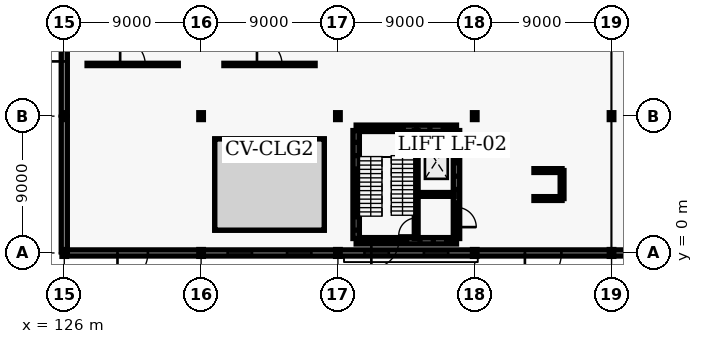
"""IFC4 building model, lengths in metres.
Left out: names, types, materials, properties, quantities, classifications, styles, units other than length and angle.
Written with IfcOpenShell. Run it as: python <this file> out.ifc"""

import sys

from ifc_helpers import new_model, si_unit, direction, frame, frame_2d, origin, origin_2d, place, context, subcontext, project, spatial, rectangle, i_section, extrude, element, fill, save


model = new_model("IFC4")
c1 = context("Model", 3, precision=1e-05, world=origin(), true_north=direction((0.0, 1.0)))
c2 = subcontext(c1, "Body", "Model", "MODEL_VIEW")
j1 = project(units=[si_unit("LENGTHUNIT", "METRE"), si_unit("PLANEANGLEUNIT", "RADIAN")], contexts=[c1])
p1 = place(None, origin())
s1 = spatial("IfcSite", under=j1, at=p1, CompositionType="ELEMENT")
p2 = place(p1, origin())
s2 = spatial("IfcBuilding", under=s1, at=p2, CompositionType="ELEMENT")
p3 = place(p2, origin())
s3 = spatial("IfcBuildingStorey", under=s2, at=p3, CompositionType="ELEMENT", Elevation=0.0)
for number, where, z_axis, x_axis in (
    (1, (126.0, 0.0, 0.0), (0.0, 0.0, 1.0), (1.0, 0.0, 0.0)),
    (2, (126.0, 9.0, 0.0), (0.0, 0.0, 1.0), (1.0, 0.0, 0.0)),
    (3, (135.0, 0.0, 0.0), (0.0, 0.0, 1.0), (1.0, 0.0, 0.0)),
    (4, (135.0, 9.0, 0.0), (0.0, 0.0, 1.0), (1.0, 0.0, 0.0)),
    (5, (144.0, 0.0, 0.0), (0.0, 0.0, 1.0), (1.0, 0.0, 0.0)),
    (6, (144.0, 9.0, 0.0), (0.0, 0.0, 1.0), (1.0, 0.0, 0.0)),
    (7, (153.0, 0.0, 0.0), (0.0, 0.0, 1.0), (1.0, 0.0, 0.0)),
    (8, (153.0, 9.0, 0.0), (0.0, 0.0, 1.0), (1.0, 0.0, 0.0)),
    (9, (162.0, 0.0, 0.0), (0.0, 0.0, 1.0), (1.0, 0.0, 0.0)),
    (10, (162.0, 9.0, 0.0), (0.0, 0.0, 1.0), (1.0, 0.0, 0.0)),
):
    element("IfcColumn", number, at=place(p3, frame(where, z_axis=z_axis, x_axis=x_axis)), inside=s3, PredefinedType="COLUMN", context=c2, shape_type="SweptSolid", body=[
        extrude(i_section(OverallWidth=0.3, OverallDepth=0.45, WebThickness=0.014, FlangeThickness=0.026, FilletRadius=0.027, at=origin_2d()), origin(), (0.0, 0.0, 1.0), 5.4),
    ])
p4 = place(p3, frame((126.06, 0.0, 0.0), z_axis=(0.0, 0.0, 1.0), x_axis=(1.0, 0.0, 0.0)))
e11 = element("IfcWall", 11, at=p4, inside=s3, PredefinedType="SOLIDWALL", context=c2, shape_type="SweptSolid", body=[
    extrude(rectangle(XDim=8.88, YDim=0.4, at=frame_2d((4.44, 0.0))), origin(), (0.0, 0.0, 1.0), 4.7),
])
p5 = place(p4, frame((3.44, 0.0, 0.0)))
e12 = element("IfcOpeningElement", 12, at=p5, cuts=e11, PredefinedType="OPENING", context=c2, shape_type="SweptSolid", body=[
    extrude(rectangle(XDim=2.0, YDim=2.3, at=frame_2d((1.0, 1.15))), frame((0.0, 0.21, 0.0), z_axis=(0.0, -1.0, 0.0), x_axis=(1.0, 0.0, 0.0)), (0.0, 0.0, 1.0), 0.42),
])
p6 = place(p3, frame((135.06, 0.0, 0.0), z_axis=(0.0, 0.0, 1.0), x_axis=(1.0, 0.0, 0.0)))
e13 = element("IfcWall", 13, at=p6, inside=s3, PredefinedType="SOLIDWALL", context=c2, shape_type="SweptSolid", body=[
    extrude(rectangle(XDim=8.88, YDim=0.4, at=frame_2d((4.44, 0.0))), origin(), (0.0, 0.0, 1.0), 4.7),
])
p7 = place(p6, frame((1.686, 0.0, 0.9)))
e14 = element("IfcOpeningElement", 14, at=p7, cuts=e13, PredefinedType="OPENING", context=c2, shape_type="SweptSolid", body=[
    extrude(rectangle(XDim=1.6, YDim=2.4, at=frame_2d((0.8, 1.2))), frame((0.0, 0.21, 0.0), z_axis=(0.0, -1.0, 0.0), x_axis=(1.0, 0.0, 0.0)), (0.0, 0.0, 1.0), 0.42),
])
p8 = place(p6, frame((5.594, 0.0, 0.9)))
e15 = element("IfcOpeningElement", 15, at=p8, cuts=e13, PredefinedType="OPENING", context=c2, shape_type="SweptSolid", body=[
    extrude(rectangle(XDim=1.6, YDim=2.4, at=frame_2d((0.8, 1.2))), frame((0.0, 0.21, 0.0), z_axis=(0.0, -1.0, 0.0), x_axis=(1.0, 0.0, 0.0)), (0.0, 0.0, 1.0), 0.42),
])
p9 = place(p3, frame((144.06, 0.0, 0.0), z_axis=(0.0, 0.0, 1.0), x_axis=(1.0, 0.0, 0.0)))
e16 = element("IfcWall", 16, at=p9, inside=s3, PredefinedType="SOLIDWALL", context=c2, shape_type="SweptSolid", body=[
    extrude(rectangle(XDim=8.88, YDim=0.4, at=frame_2d((4.44, 0.0))), origin(), (0.0, 0.0, 1.0), 4.7),
])
p10 = place(p9, frame((1.686, 0.0, 0.9)))
e17 = element("IfcOpeningElement", 17, at=p10, cuts=e16, PredefinedType="OPENING", context=c2, shape_type="SweptSolid", body=[
    extrude(rectangle(XDim=1.6, YDim=2.4, at=frame_2d((0.8, 1.2))), frame((0.0, 0.21, 0.0), z_axis=(0.0, -1.0, 0.0), x_axis=(1.0, 0.0, 0.0)), (0.0, 0.0, 1.0), 0.42),
])
p11 = place(p9, frame((5.594, 0.0, 0.9)))
e18 = element("IfcOpeningElement", 18, at=p11, cuts=e16, PredefinedType="OPENING", context=c2, shape_type="SweptSolid", body=[
    extrude(rectangle(XDim=1.6, YDim=2.4, at=frame_2d((0.8, 1.2))), frame((0.0, 0.21, 0.0), z_axis=(0.0, -1.0, 0.0), x_axis=(1.0, 0.0, 0.0)), (0.0, 0.0, 1.0), 0.42),
])
p12 = place(p3, frame((153.06, 0.0, 0.0), z_axis=(0.0, 0.0, 1.0), x_axis=(1.0, 0.0, 0.0)))
e19 = element("IfcWall", 19, at=p12, inside=s3, PredefinedType="SOLIDWALL", context=c2, shape_type="SweptSolid", body=[
    extrude(rectangle(XDim=8.88, YDim=0.4, at=frame_2d((4.44, 0.0))), origin(), (0.0, 0.0, 1.0), 4.7),
])
p13 = place(p12, frame((3.24, 0.0, 0.0)))
e20 = element("IfcOpeningElement", 20, at=p13, cuts=e19, PredefinedType="OPENING", context=c2, shape_type="SweptSolid", body=[
    extrude(rectangle(XDim=2.4, YDim=2.5, at=frame_2d((1.2, 1.25))), frame((0.0, 0.21, 0.0), z_axis=(0.0, -1.0, 0.0), x_axis=(1.0, 0.0, 0.0)), (0.0, 0.0, 1.0), 0.42),
])
p14 = place(p3, frame((162.06, 0.0, 0.0), z_axis=(0.0, 0.0, 1.0), x_axis=(1.0, 0.0, 0.0)))
e21 = element("IfcWall", 21, at=p14, inside=s3, PredefinedType="SOLIDWALL", context=c2, shape_type="SweptSolid", body=[
    extrude(rectangle(XDim=8.88, YDim=0.4, at=frame_2d((4.44, 0.0))), origin(), (0.0, 0.0, 1.0), 4.7),
])
p15 = place(p14, frame((1.686, 0.0, 0.9)))
e22 = element("IfcOpeningElement", 22, at=p15, cuts=e21, PredefinedType="OPENING", context=c2, shape_type="SweptSolid", body=[
    extrude(rectangle(XDim=1.6, YDim=2.4, at=frame_2d((0.8, 1.2))), frame((0.0, 0.21, 0.0), z_axis=(0.0, -1.0, 0.0), x_axis=(1.0, 0.0, 0.0)), (0.0, 0.0, 1.0), 0.42),
])
p16 = place(p14, frame((5.594, 0.0, 0.9)))
e23 = element("IfcOpeningElement", 23, at=p16, cuts=e21, PredefinedType="OPENING", context=c2, shape_type="SweptSolid", body=[
    extrude(rectangle(XDim=1.6, YDim=2.4, at=frame_2d((0.8, 1.2))), frame((0.0, 0.21, 0.0), z_axis=(0.0, -1.0, 0.0), x_axis=(1.0, 0.0, 0.0)), (0.0, 0.0, 1.0), 0.42),
])
p17 = place(p3, frame((126.0, 0.06, 0.0), z_axis=(0.0, 0.0, 1.0), x_axis=(0.0, 1.0, 0.0)))
e24 = element("IfcWall", 24, at=p17, inside=s3, PredefinedType="SOLIDWALL", context=c2, shape_type="SweptSolid", body=[
    extrude(rectangle(XDim=8.88, YDim=0.4, at=frame_2d((4.44, 0.0))), origin(), (0.0, 0.0, 1.0), 4.7),
])
p18 = place(p3, frame((126.0, 9.06, 0.0), z_axis=(0.0, 0.0, 1.0), x_axis=(0.0, 1.0, 0.0)))
e25 = element("IfcWall", 25, at=p18, inside=s3, PredefinedType="SOLIDWALL", context=c2, shape_type="SweptSolid", body=[
    extrude(rectangle(XDim=8.88, YDim=0.4, at=frame_2d((4.44, 0.0))), origin(), (0.0, 0.0, 1.0), 4.7),
])
p19 = place(p18, frame((3.54, 0.0, 0.0)))
e26 = element("IfcOpeningElement", 26, at=p19, cuts=e25, PredefinedType="OPENING", context=c2, shape_type="SweptSolid", body=[
    extrude(rectangle(XDim=1.8, YDim=2.2, at=frame_2d((0.9, 1.1))), frame((0.0, 0.21, 0.0), z_axis=(0.0, -1.0, 0.0), x_axis=(1.0, 0.0, 0.0)), (0.0, 0.0, 1.0), 0.42),
])
p20 = place(p3, frame((145.2, 0.8, 0.0), z_axis=(0.0, 0.0, 1.0), x_axis=(1.0, 0.0, 0.0)))
e27 = element("IfcWall", 27, at=p20, inside=s3, PredefinedType="SHEAR", context=c2, shape_type="SweptSolid", body=[
    extrude(rectangle(XDim=6.6, YDim=0.42, at=frame_2d((3.3, 0.0))), origin(), (0.0, 0.0, 1.0), 5.4),
])
p21 = place(p20, frame((1.0, 0.0, 0.0)))
e28 = element("IfcOpeningElement", 28, at=p21, cuts=e27, PredefinedType="OPENING", context=c2, shape_type="SweptSolid", body=[
    extrude(rectangle(XDim=1.8, YDim=2.15, at=frame_2d((0.9, 1.075))), frame((0.0, 0.22, 0.0), z_axis=(0.0, -1.0, 0.0), x_axis=(1.0, 0.0, 0.0)), (0.0, 0.0, 1.0), 0.44),
])
p22 = place(p3, frame((145.2, 8.2, 0.0), z_axis=(0.0, 0.0, 1.0), x_axis=(1.0, 0.0, 0.0)))
e29 = element("IfcWall", 29, at=p22, inside=s3, PredefinedType="SHEAR", context=c2, shape_type="SweptSolid", body=[
    extrude(rectangle(XDim=6.6, YDim=0.42, at=frame_2d((3.3, 0.0))), origin(), (0.0, 0.0, 1.0), 5.4),
])
p23 = place(p3, frame((145.2, 0.95, 0.0), z_axis=(0.0, 0.0, 1.0), x_axis=(0.0, 1.0, 0.0)))
e30 = element("IfcWall", 30, at=p23, inside=s3, PredefinedType="SHEAR", context=c2, shape_type="SweptSolid", body=[
    extrude(rectangle(XDim=7.1, YDim=0.42, at=frame_2d((3.55, 0.0))), origin(), (0.0, 0.0, 1.0), 5.4),
])
p24 = place(p3, frame((151.8, 0.95, 0.0), z_axis=(0.0, 0.0, 1.0), x_axis=(0.0, 1.0, 0.0)))
e31 = element("IfcWall", 31, at=p24, inside=s3, PredefinedType="SHEAR", context=c2, shape_type="SweptSolid", body=[
    extrude(rectangle(XDim=7.1, YDim=0.42, at=frame_2d((3.55, 0.0))), origin(), (0.0, 0.0, 1.0), 5.4),
])
p25 = place(p24, frame((0.75, 0.0, 0.0)))
e32 = element("IfcOpeningElement", 32, at=p25, cuts=e31, PredefinedType="OPENING", context=c2, shape_type="SweptSolid", body=[
    extrude(rectangle(XDim=1.3, YDim=2.15, at=frame_2d((0.65, 1.075))), frame((0.0, 0.22, 0.0), z_axis=(0.0, -1.0, 0.0), x_axis=(1.0, 0.0, 0.0)), (0.0, 0.0, 1.0), 0.44),
])
p26 = place(p3, frame((149.15, 0.95, 0.0), z_axis=(0.0, 0.0, 1.0), x_axis=(0.0, 1.0, 0.0)))
e33 = element("IfcWall", 33, at=p26, inside=s3, PredefinedType="SHEAR", context=c2, shape_type="SweptSolid", body=[
    extrude(rectangle(XDim=7.1, YDim=0.25, at=frame_2d((3.55, 0.0))), origin(), (0.0, 0.0, 1.0), 5.4),
])
p27 = place(p26, frame((0.2, 0.0, 0.0)))
e34 = element("IfcOpeningElement", 34, at=p27, cuts=e33, PredefinedType="OPENING", context=c2, shape_type="SweptSolid", body=[
    extrude(rectangle(XDim=1.15, YDim=2.15, at=frame_2d((0.575, 1.075))), frame((0.0, 0.135, 0.0), z_axis=(0.0, -1.0, 0.0), x_axis=(1.0, 0.0, 0.0)), (0.0, 0.0, 1.0), 0.27),
])
p28 = place(p3, frame((149.27, 3.85, 0.0), z_axis=(0.0, 0.0, 1.0), x_axis=(1.0, 0.0, 0.0)))
e35 = element("IfcWall", 35, at=p28, inside=s3, PredefinedType="SHEAR", context=c2, shape_type="SweptSolid", body=[
    extrude(rectangle(XDim=2.38, YDim=0.25, at=frame_2d((1.19, 0.0))), origin(), (0.0, 0.0, 1.0), 5.4),
])
p29 = place(p28, frame((0.64, 0.0, 0.0)))
e36 = element("IfcOpeningElement", 36, at=p29, cuts=e35, PredefinedType="OPENING", context=c2, shape_type="SweptSolid", body=[
    extrude(rectangle(XDim=1.1, YDim=2.15, at=frame_2d((0.55, 1.075))), frame((0.0, 0.135, 0.0), z_axis=(0.0, -1.0, 0.0), x_axis=(1.0, 0.0, 0.0)), (0.0, 0.0, 1.0), 0.27),
])
for number, where, z_axis, x_axis in (
    (37, (156.895, 3.58, 0.0), (0.0, 0.0, 1.0), (1.0, 0.0, 0.0)),
    (38, (156.895, 5.42, 0.0), (0.0, 0.0, 1.0), (1.0, 0.0, 0.0)),
):
    element("IfcWall", number, at=place(p3, frame(where, z_axis=z_axis, x_axis=x_axis)), inside=s3, PredefinedType="SHEAR", context=c2, shape_type="SweptSolid", body=[
        extrude(rectangle(XDim=1.85, YDim=0.25, at=frame_2d((0.925, 0.0))), origin(), (0.0, 0.0, 1.0), 5.4),
    ])
p30 = place(p3, frame((158.745, 3.58, 0.0), z_axis=(0.0, 0.0, 1.0), x_axis=(0.0, 1.0, 0.0)))
e39 = element("IfcWall", 39, at=p30, inside=s3, PredefinedType="SHEAR", context=c2, shape_type="SweptSolid", body=[
    extrude(rectangle(XDim=1.84, YDim=0.25, at=frame_2d((0.92, 0.0))), origin(), (0.0, 0.0, 1.0), 5.4),
])
p31 = place(p3, frame((127.5, 12.4, 0.0), z_axis=(0.0, 0.0, 1.0), x_axis=(1.0, 0.0, 0.0)))
e40 = element("IfcWall", 40, at=p31, inside=s3, PredefinedType="PARTITIONING", context=c2, shape_type="SweptSolid", body=[
    extrude(rectangle(XDim=6.0, YDim=0.15, at=frame_2d((3.0, 0.0))), origin(), (0.0, 0.0, 1.0), 4.3),
])
p32 = place(p31, frame((2.175, 0.0, 0.0)))
e41 = element("IfcOpeningElement", 41, at=p32, cuts=e40, PredefinedType="OPENING", context=c2, shape_type="SweptSolid", body=[
    extrude(rectangle(XDim=1.65, YDim=2.25, at=frame_2d((0.825, 1.125))), frame((0.0, 0.085, 0.0), z_axis=(0.0, -1.0, 0.0), x_axis=(1.0, 0.0, 0.0)), (0.0, 0.0, 1.0), 0.17),
])
p33 = place(p3, frame((136.5, 12.4, 0.0), z_axis=(0.0, 0.0, 1.0), x_axis=(1.0, 0.0, 0.0)))
e42 = element("IfcWall", 42, at=p33, inside=s3, PredefinedType="PARTITIONING", context=c2, shape_type="SweptSolid", body=[
    extrude(rectangle(XDim=6.0, YDim=0.15, at=frame_2d((3.0, 0.0))), origin(), (0.0, 0.0, 1.0), 4.3),
])
p34 = place(p33, frame((2.175, 0.0, 0.0)))
e43 = element("IfcOpeningElement", 43, at=p34, cuts=e42, PredefinedType="OPENING", context=c2, shape_type="SweptSolid", body=[
    extrude(rectangle(XDim=1.65, YDim=2.25, at=frame_2d((0.825, 1.125))), frame((0.0, 0.085, 0.0), z_axis=(0.0, -1.0, 0.0), x_axis=(1.0, 0.0, 0.0)), (0.0, 0.0, 1.0), 0.17),
])
p35 = place(p5, frame((2.0, 0.0, 0.0), z_axis=(0.0, 0.0, 1.0), x_axis=(-1.0, 0.0, 0.0)))
e44 = element("IfcDoor", 44, at=p35, inside=s3, OperationType="DOUBLE_DOOR_SINGLE_SWING", PredefinedType="DOOR", context=c2, shape_type="SweptSolid", body=[
    extrude(rectangle(XDim=2.0, YDim=2.3, at=frame_2d((1.0, 1.15))), frame((0.0, 0.025, 0.0), z_axis=(0.0, -1.0, 0.0), x_axis=(1.0, 0.0, 0.0)), (0.0, 0.0, 1.0), 0.05),
])
fill(e12, e44)
p36 = place(p7, origin())
e45 = element("IfcWindow", 45, at=p36, inside=s3, PartitioningType="SINGLE_PANEL", PredefinedType="WINDOW", context=c2, shape_type="SweptSolid", body=[
    extrude(rectangle(XDim=1.6, YDim=2.4, at=frame_2d((0.8, 1.2))), frame((0.0, 0.03, 0.0), z_axis=(0.0, -1.0, 0.0), x_axis=(1.0, 0.0, 0.0)), (0.0, 0.0, 1.0), 0.06),
])
fill(e14, e45)
p37 = place(p8, origin())
e46 = element("IfcWindow", 46, at=p37, inside=s3, PartitioningType="SINGLE_PANEL", PredefinedType="WINDOW", context=c2, shape_type="SweptSolid", body=[
    extrude(rectangle(XDim=1.6, YDim=2.4, at=frame_2d((0.8, 1.2))), frame((0.0, 0.03, 0.0), z_axis=(0.0, -1.0, 0.0), x_axis=(1.0, 0.0, 0.0)), (0.0, 0.0, 1.0), 0.06),
])
fill(e15, e46)
p38 = place(p10, origin())
e47 = element("IfcWindow", 47, at=p38, inside=s3, PartitioningType="SINGLE_PANEL", PredefinedType="WINDOW", context=c2, shape_type="SweptSolid", body=[
    extrude(rectangle(XDim=1.6, YDim=2.4, at=frame_2d((0.8, 1.2))), frame((0.0, 0.03, 0.0), z_axis=(0.0, -1.0, 0.0), x_axis=(1.0, 0.0, 0.0)), (0.0, 0.0, 1.0), 0.06),
])
fill(e17, e47)
p39 = place(p11, origin())
e48 = element("IfcWindow", 48, at=p39, inside=s3, PartitioningType="SINGLE_PANEL", PredefinedType="WINDOW", context=c2, shape_type="SweptSolid", body=[
    extrude(rectangle(XDim=1.6, YDim=2.4, at=frame_2d((0.8, 1.2))), frame((0.0, 0.03, 0.0), z_axis=(0.0, -1.0, 0.0), x_axis=(1.0, 0.0, 0.0)), (0.0, 0.0, 1.0), 0.06),
])
fill(e18, e48)
p40 = place(p13, frame((2.4, 0.0, 0.0), z_axis=(0.0, 0.0, 1.0), x_axis=(-1.0, 0.0, 0.0)))
e49 = element("IfcDoor", 49, at=p40, inside=s3, OperationType="DOUBLE_DOOR_SINGLE_SWING", PredefinedType="DOOR", context=c2, shape_type="SweptSolid", body=[
    extrude(rectangle(XDim=2.4, YDim=2.5, at=frame_2d((1.2, 1.25))), frame((0.0, 0.025, 0.0), z_axis=(0.0, -1.0, 0.0), x_axis=(1.0, 0.0, 0.0)), (0.0, 0.0, 1.0), 0.05),
])
fill(e20, e49)
p41 = place(p19, origin())
e50 = element("IfcDoor", 50, at=p41, inside=s3, OperationType="DOUBLE_DOOR_SINGLE_SWING", PredefinedType="DOOR", context=c2, shape_type="SweptSolid", body=[
    extrude(rectangle(XDim=1.8, YDim=2.2, at=frame_2d((0.9, 1.1))), frame((0.0, 0.025, 0.0), z_axis=(0.0, -1.0, 0.0), x_axis=(1.0, 0.0, 0.0)), (0.0, 0.0, 1.0), 0.05),
])
fill(e26, e50)
p42 = place(p25, frame((1.3, 0.0, 0.0), z_axis=(0.0, 0.0, 1.0), x_axis=(-1.0, 0.0, 0.0)))
e51 = element("IfcDoor", 51, at=p42, inside=s3, OperationType="DOUBLE_DOOR_SINGLE_SWING", PredefinedType="DOOR", context=c2, shape_type="SweptSolid", body=[
    extrude(rectangle(XDim=1.3, YDim=2.15, at=frame_2d((0.65, 1.075))), frame((0.0, 0.025, 0.0), z_axis=(0.0, -1.0, 0.0), x_axis=(1.0, 0.0, 0.0)), (0.0, 0.0, 1.0), 0.05),
])
fill(e32, e51)
p43 = place(p27, origin())
e52 = element("IfcDoor", 52, at=p43, inside=s3, OperationType="SINGLE_SWING_LEFT", PredefinedType="DOOR", context=c2, shape_type="SweptSolid", body=[
    extrude(rectangle(XDim=1.15, YDim=2.15, at=frame_2d((0.575, 1.075))), frame((0.0, 0.025, 0.0), z_axis=(0.0, -1.0, 0.0), x_axis=(1.0, 0.0, 0.0)), (0.0, 0.0, 1.0), 0.05),
])
fill(e34, e52)
p44 = place(p21, frame((1.8, 0.0, 0.0), z_axis=(0.0, 0.0, 1.0), x_axis=(-1.0, 0.0, 0.0)))
e53 = element("IfcDoor", 53, at=p44, inside=s3, OperationType="DOUBLE_DOOR_SINGLE_SWING", PredefinedType="DOOR", context=c2, shape_type="SweptSolid", body=[
    extrude(rectangle(XDim=1.8, YDim=2.15, at=frame_2d((0.9, 1.075))), frame((0.0, 0.025, 0.0), z_axis=(0.0, -1.0, 0.0), x_axis=(1.0, 0.0, 0.0)), (0.0, 0.0, 1.0), 0.05),
])
fill(e28, e53)
p45 = place(p29, origin())
e54 = element("IfcDoor", 54, at=p45, inside=s3, OperationType="SLIDING_TO_LEFT", PredefinedType="DOOR", context=c2, shape_type="SweptSolid", body=[
    extrude(rectangle(XDim=1.1, YDim=2.15, at=frame_2d((0.55, 1.075))), frame((0.0, 0.025, 0.0), z_axis=(0.0, -1.0, 0.0), x_axis=(1.0, 0.0, 0.0)), (0.0, 0.0, 1.0), 0.05),
])
fill(e36, e54)
p46 = place(p32, origin())
e55 = element("IfcDoor", 55, at=p46, inside=s3, OperationType="DOUBLE_DOOR_SINGLE_SWING", PredefinedType="DOOR", context=c2, shape_type="SweptSolid", body=[
    extrude(rectangle(XDim=1.65, YDim=2.25, at=frame_2d((0.825, 1.125))), frame((0.0, 0.025, 0.0), z_axis=(0.0, -1.0, 0.0), x_axis=(1.0, 0.0, 0.0)), (0.0, 0.0, 1.0), 0.05),
])
fill(e41, e55)
p47 = place(p34, origin())
e56 = element("IfcDoor", 56, at=p47, inside=s3, OperationType="DOUBLE_DOOR_SINGLE_SWING", PredefinedType="DOOR", context=c2, shape_type="SweptSolid", body=[
    extrude(rectangle(XDim=1.65, YDim=2.25, at=frame_2d((0.825, 1.125))), frame((0.0, 0.025, 0.0), z_axis=(0.0, -1.0, 0.0), x_axis=(1.0, 0.0, 0.0)), (0.0, 0.0, 1.0), 0.05),
])
fill(e43, e56)
save(model, sys.argv[1])
